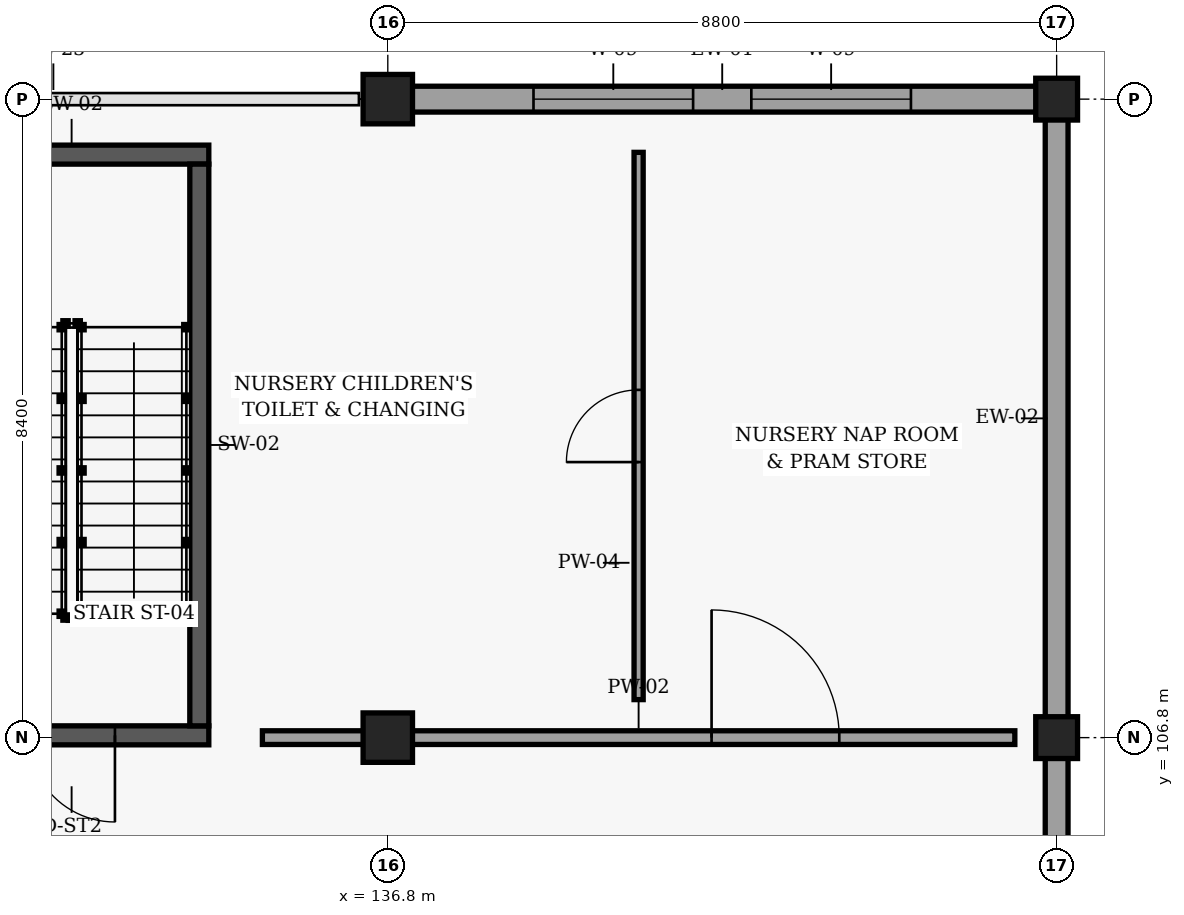
"""IFC4 building model, lengths in metres.
Left out: names, types, materials, properties, quantities, classifications, styles, units other than length and angle.
Written with IfcOpenShell. Run it as: python <this file> out.ifc"""

import sys

from ifc_helpers import new_model, si_unit, direction, frame, frame_2d, origin, origin_2d, place, context, subcontext, project, spatial, rectangle, circle, extrude, element, fill, save


model = new_model("IFC4")
c1 = context("Model", 3, precision=1e-05, world=origin(), true_north=direction((0.0, 1.0)))
c2 = subcontext(c1, "Body", "Model", "MODEL_VIEW")
j1 = project(units=[si_unit("LENGTHUNIT", "METRE"), si_unit("PLANEANGLEUNIT", "RADIAN")], contexts=[c1])
p1 = place(None, origin())
s1 = spatial("IfcSite", under=j1, at=p1, CompositionType="ELEMENT")
p2 = place(p1, origin())
s2 = spatial("IfcBuilding", under=s1, at=p2, CompositionType="ELEMENT")
p3 = place(p2, origin())
s3 = spatial("IfcBuildingStorey", under=s2, at=p3, CompositionType="ELEMENT", Elevation=0.0)
for number, where, z_axis, x_axis in (
    (1, (136.8, 106.8, 0.0), (0.0, 0.0, 1.0), (1.0, 0.0, 0.0)),
    (2, (136.8, 115.2, 0.0), (0.0, 0.0, 1.0), (1.0, 0.0, 0.0)),
):
    element("IfcColumn", number, at=place(p3, frame(where, z_axis=z_axis, x_axis=x_axis)), inside=s3, PredefinedType="COLUMN", context=c2, shape_type="SweptSolid", body=[
        extrude(rectangle(XDim=0.65, YDim=0.65, at=origin_2d()), origin(), (0.0, 0.0, 1.0), 4.8),
    ])
for number, where, z_axis, x_axis in (
    (3, (145.6, 106.8, 0.0), (0.0, 0.0, 1.0), (1.0, 0.0, 0.0)),
    (4, (145.6, 115.2, 0.0), (0.0, 0.0, 1.0), (1.0, 0.0, 0.0)),
):
    element("IfcColumn", number, at=place(p3, frame(where, z_axis=z_axis, x_axis=x_axis)), inside=s3, PredefinedType="PILASTER", context=c2, shape_type="SweptSolid", body=[
        extrude(circle(Radius=0.275, at=origin_2d()), origin(), (0.0, 0.0, 1.0), 4.8),
    ])
p4 = place(p3, frame((136.9, 115.2, 0.0), z_axis=(0.0, 0.0, 1.0), x_axis=(1.0, 0.0, 0.0)))
e5 = element("IfcWall", 5, at=p4, inside=s3, PredefinedType="SOLIDWALL", context=c2, shape_type="SweptSolid", body=[
    extrude(rectangle(XDim=8.6, YDim=0.34, at=frame_2d((4.3, 0.0))), origin(), (0.0, 0.0, 1.0), 3.675),
])
p5 = place(p4, frame((1.817, 0.0, 0.95)))
e6 = element("IfcOpeningElement", 6, at=p5, cuts=e5, PredefinedType="OPENING", context=c2, shape_type="SweptSolid", body=[
    extrude(rectangle(XDim=2.1, YDim=1.8, at=frame_2d((1.05, 0.9))), frame((0.0, 0.18, 0.0), z_axis=(0.0, -1.0, 0.0), x_axis=(1.0, 0.0, 0.0)), (0.0, 0.0, 1.0), 0.36),
])
p6 = place(p4, frame((4.683, 0.0, 0.95)))
e7 = element("IfcOpeningElement", 7, at=p6, cuts=e5, PredefinedType="OPENING", context=c2, shape_type="SweptSolid", body=[
    extrude(rectangle(XDim=2.1, YDim=1.8, at=frame_2d((1.05, 0.9))), frame((0.0, 0.18, 0.0), z_axis=(0.0, -1.0, 0.0), x_axis=(1.0, 0.0, 0.0)), (0.0, 0.0, 1.0), 0.36),
])
p7 = place(p3, frame((145.6, 98.5, 0.0), z_axis=(0.0, 0.0, 1.0), x_axis=(0.0, 1.0, 0.0)))
e8 = element("IfcWall", 8, at=p7, inside=s3, PredefinedType="SOLIDWALL", context=c2, shape_type="SweptSolid", body=[
    extrude(rectangle(XDim=8.2, YDim=0.3, at=frame_2d((4.1, 0.0))), origin(), (0.0, 0.0, 1.0), 4.075),
])
p8 = place(p7, frame((2.3, 0.0, 0.0)))
e9 = element("IfcOpeningElement", 9, at=p8, cuts=e8, PredefinedType="OPENING", context=c2, shape_type="SweptSolid", body=[
    extrude(rectangle(XDim=1.8, YDim=2.25, at=frame_2d((0.9, 1.125))), frame((0.0, 0.16, 0.0), z_axis=(0.0, -1.0, 0.0), x_axis=(1.0, 0.0, 0.0)), (0.0, 0.0, 1.0), 0.32),
])
p9 = place(p3, frame((145.6, 106.9, 0.0), z_axis=(0.0, 0.0, 1.0), x_axis=(0.0, 1.0, 0.0)))
e10 = element("IfcWall", 10, at=p9, inside=s3, PredefinedType="SOLIDWALL", context=c2, shape_type="SweptSolid", body=[
    extrude(rectangle(XDim=8.2, YDim=0.3, at=frame_2d((4.1, 0.0))), origin(), (0.0, 0.0, 1.0), 4.075),
])
p10 = place(p3, frame((134.445, 106.83, 0.0), z_axis=(0.0, 0.0, 1.0), x_axis=(-1.0, 0.0, 0.0)))
e11 = element("IfcWall", 11, at=p10, inside=s3, PredefinedType="SHEAR", context=c2, shape_type="SweptSolid", body=[
    extrude(rectangle(XDim=3.61, YDim=0.25, at=frame_2d((1.805, 0.0))), origin(), (0.0, 0.0, 1.0), 4.56),
])
p11 = place(p10, frame((1.235, 0.0, 0.0)))
e12 = element("IfcOpeningElement", 12, at=p11, cuts=e11, PredefinedType="OPENING", context=c2, shape_type="SweptSolid", body=[
    extrude(rectangle(XDim=1.14, YDim=2.15, at=frame_2d((0.57, 1.075))), frame((0.0, 0.135, 0.0), z_axis=(0.0, -1.0, 0.0), x_axis=(1.0, 0.0, 0.0)), (0.0, 0.0, 1.0), 0.27),
])
p12 = place(p3, frame((130.835, 114.47, 0.0), z_axis=(0.0, 0.0, 1.0), x_axis=(1.0, 0.0, 0.0)))
e13 = element("IfcWall", 13, at=p12, inside=s3, PredefinedType="SHEAR", context=c2, shape_type="SweptSolid", body=[
    extrude(rectangle(XDim=3.61, YDim=0.25, at=frame_2d((1.805, 0.0))), origin(), (0.0, 0.0, 1.0), 4.56),
])
p13 = place(p3, frame((134.32, 114.345, 0.0), z_axis=(0.0, 0.0, 1.0), x_axis=(0.0, -1.0, 0.0)))
e14 = element("IfcWall", 14, at=p13, inside=s3, PredefinedType="SHEAR", context=c2, shape_type="SweptSolid", body=[
    extrude(rectangle(XDim=7.39, YDim=0.25, at=frame_2d((3.695, 0.0))), origin(), (0.0, 0.0, 1.0), 4.56),
])
p14 = place(p3, frame((135.15, 106.8, 0.0), z_axis=(0.0, 0.0, 1.0), x_axis=(1.0, 0.0, 0.0)))
e15 = element("IfcWall", 15, at=p14, inside=s3, PredefinedType="PARTITIONING", context=c2, shape_type="SweptSolid", body=[
    extrude(rectangle(XDim=9.9, YDim=0.18, at=frame_2d((4.95, 0.0))), origin(), (0.0, 0.0, 1.0), 3.675),
])
p15 = place(p14, frame((5.91, 0.0, 0.0)))
e16 = element("IfcOpeningElement", 16, at=p15, cuts=e15, PredefinedType="OPENING", context=c2, shape_type="SweptSolid", body=[
    extrude(rectangle(XDim=1.68, YDim=2.26, at=frame_2d((0.84, 1.13))), frame((0.0, 0.1, 0.0), z_axis=(0.0, -1.0, 0.0), x_axis=(1.0, 0.0, 0.0)), (0.0, 0.0, 1.0), 0.2),
])
p16 = place(p3, frame((140.1, 107.3, 0.0), z_axis=(0.0, 0.0, 1.0), x_axis=(0.0, 1.0, 0.0)))
e17 = element("IfcWall", 17, at=p16, inside=s3, PredefinedType="PARTITIONING", context=c2, shape_type="SweptSolid", body=[
    extrude(rectangle(XDim=7.2, YDim=0.12, at=frame_2d((3.6, 0.0))), origin(), (0.0, 0.0, 1.0), 4.545),
])
p17 = place(p16, frame((3.125, 0.0, 0.0)))
e18 = element("IfcOpeningElement", 18, at=p17, cuts=e17, PredefinedType="OPENING", context=c2, shape_type="SweptSolid", body=[
    extrude(rectangle(XDim=0.95, YDim=2.12, at=frame_2d((0.475, 1.06))), frame((0.0, 0.07, 0.0), z_axis=(0.0, -1.0, 0.0), x_axis=(1.0, 0.0, 0.0)), (0.0, 0.0, 1.0), 0.14),
])
p18 = place(p5, origin())
e19 = element("IfcWindow", 19, at=p18, inside=s3, PartitioningType="SINGLE_PANEL", PredefinedType="WINDOW", context=c2, shape_type="SweptSolid", body=[
    extrude(rectangle(XDim=2.1, YDim=1.8, at=frame_2d((1.05, 0.9))), frame((0.0, 0.03, 0.0), z_axis=(0.0, -1.0, 0.0), x_axis=(1.0, 0.0, 0.0)), (0.0, 0.0, 1.0), 0.06),
])
fill(e6, e19)
p19 = place(p6, origin())
e20 = element("IfcWindow", 20, at=p19, inside=s3, PartitioningType="SINGLE_PANEL", PredefinedType="WINDOW", context=c2, shape_type="SweptSolid", body=[
    extrude(rectangle(XDim=2.1, YDim=1.8, at=frame_2d((1.05, 0.9))), frame((0.0, 0.03, 0.0), z_axis=(0.0, -1.0, 0.0), x_axis=(1.0, 0.0, 0.0)), (0.0, 0.0, 1.0), 0.06),
])
fill(e7, e20)
p20 = place(p11, origin())
e21 = element("IfcDoor", 21, at=p20, inside=s3, OperationType="SINGLE_SWING_LEFT", PredefinedType="DOOR", context=c2, shape_type="SweptSolid", body=[
    extrude(rectangle(XDim=1.14, YDim=2.15, at=frame_2d((0.57, 1.075))), frame((0.0, 0.025, 0.0), z_axis=(0.0, -1.0, 0.0), x_axis=(1.0, 0.0, 0.0)), (0.0, 0.0, 1.0), 0.05),
])
fill(e12, e21)
p21 = place(p15, origin())
e22 = element("IfcDoor", 22, at=p21, inside=s3, OperationType="DOUBLE_DOOR_SINGLE_SWING", PredefinedType="DOOR", context=c2, shape_type="SweptSolid", body=[
    extrude(rectangle(XDim=1.68, YDim=2.26, at=frame_2d((0.84, 1.13))), frame((0.0, 0.025, 0.0), z_axis=(0.0, -1.0, 0.0), x_axis=(1.0, 0.0, 0.0)), (0.0, 0.0, 1.0), 0.05),
])
fill(e16, e22)
p22 = place(p17, origin())
e23 = element("IfcDoor", 23, at=p22, inside=s3, OperationType="SINGLE_SWING_LEFT", PredefinedType="DOOR", context=c2, shape_type="SweptSolid", body=[
    extrude(rectangle(XDim=0.95, YDim=2.12, at=frame_2d((0.475, 1.06))), frame((0.0, 0.025, 0.0), z_axis=(0.0, -1.0, 0.0), x_axis=(1.0, 0.0, 0.0)), (0.0, 0.0, 1.0), 0.05),
])
fill(e18, e23)
save(model, sys.argv[1])
